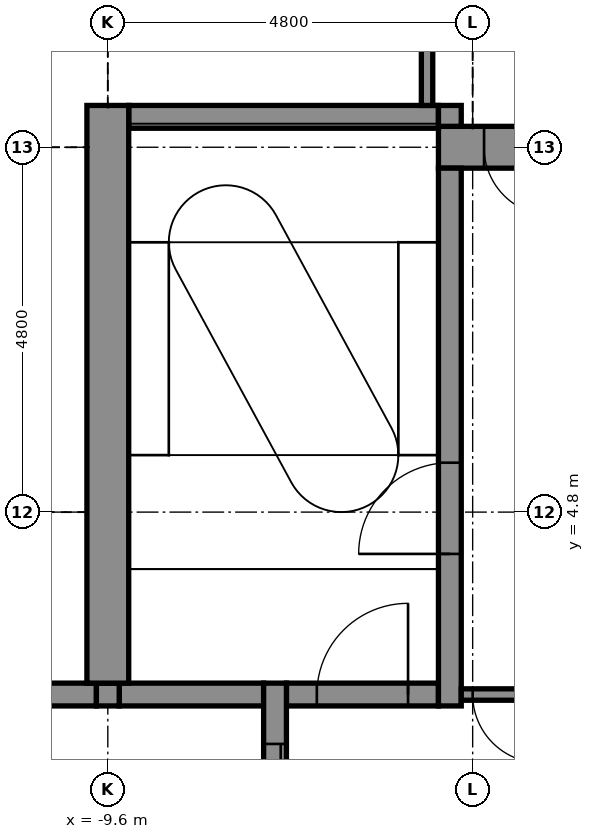
"""IFC4 building model, lengths in metres.
Left out: names, types, materials, properties, quantities, classifications, styles, units other than length and angle.
Written with IfcOpenShell. Run it as: python <this file> out.ifc"""

import sys

from ifc_helpers import new_model, si_unit, direction, frame, frame_2d, origin, place, context, subcontext, project, spatial, rectangle, extrude, element, fill, save


model = new_model("IFC4")
c1 = context("Model", 3, precision=1e-05, world=origin(), true_north=direction((0.0, 1.0)))
c2 = subcontext(c1, "Body", "Model", "MODEL_VIEW")
j1 = project(units=[si_unit("LENGTHUNIT", "METRE"), si_unit("PLANEANGLEUNIT", "RADIAN")], contexts=[c1])
p1 = place(None, origin())
s1 = spatial("IfcSite", under=j1, at=p1, CompositionType="ELEMENT")
p2 = place(p1, origin())
s2 = spatial("IfcBuilding", under=s1, at=p2, CompositionType="ELEMENT")
p3 = place(p2, frame((0.0, 0.0, 242.3)))
s3 = spatial("IfcBuildingStorey", under=s2, at=p3, CompositionType="ELEMENT", Elevation=242.3)
p4 = place(p3, frame((-10.85, 2.4, -0.15), z_axis=(0.0, 0.0, 1.0), x_axis=(1.0, 0.0, 0.0)))
e1 = element("IfcWall", 1, at=p4, inside=s3, PredefinedType="STANDARD", context=c2, shape_type="SweptSolid", body=[
    extrude(rectangle(XDim=1.1, YDim=0.3, at=frame_2d((0.55, 0.0))), origin(), (0.0, 0.0, 1.0), 3.9),
])
p5 = place(p3, frame((-9.45, 2.4, -0.15), z_axis=(0.0, 0.0, 1.0), x_axis=(1.0, 0.0, 0.0)))
e2 = element("IfcWall", 2, at=p5, inside=s3, PredefinedType="STANDARD", context=c2, shape_type="SweptSolid", body=[
    extrude(rectangle(XDim=1.9, YDim=0.3, at=frame_2d((0.95, 0.0))), origin(), (0.0, 0.0, 1.0), 3.9),
])
p6 = place(p3, frame((-7.25, 2.4, -0.15), z_axis=(0.0, 0.0, 1.0), x_axis=(1.0, 0.0, 0.0)))
e3 = element("IfcWall", 3, at=p6, inside=s3, PredefinedType="STANDARD", context=c2, shape_type="SweptSolid", body=[
    extrude(rectangle(XDim=2.0, YDim=0.3, at=frame_2d((1.0, 0.0))), origin(), (0.0, 0.0, 1.0), 3.9),
])
p7 = place(p6, frame((0.4, 0.0, 0.15)))
e4 = element("IfcOpeningElement", 4, at=p7, cuts=e3, PredefinedType="OPENING", context=c2, shape_type="SweptSolid", body=[
    extrude(rectangle(XDim=1.2, YDim=2.1, at=frame_2d((0.6, 1.05))), frame((0.0, 0.16, 0.0), z_axis=(0.0, -1.0, 0.0), x_axis=(1.0, 0.0, 0.0)), (0.0, 0.0, 1.0), 0.32),
])
p8 = place(p3, frame((-5.25, 9.6, -0.15), z_axis=(0.0, 0.0, 1.0), x_axis=(1.0, 0.0, 0.0)))
e5 = element("IfcWall", 5, at=p8, inside=s3, PredefinedType="SHEAR", context=c2, shape_type="SweptSolid", body=[
    extrude(rectangle(XDim=14.575, YDim=0.55, at=frame_2d((7.288, 0.0))), origin(), (0.0, 0.0, 1.0), 3.9),
])
p9 = place(p8, frame((0.6, 0.0, 0.15)))
e6 = element("IfcOpeningElement", 6, at=p9, cuts=e5, PredefinedType="OPENING", context=c2, shape_type="SweptSolid", body=[
    extrude(rectangle(XDim=0.9, YDim=2.1, at=frame_2d((0.45, 1.05))), frame((0.0, 0.285, 0.0), z_axis=(0.0, -1.0, 0.0), x_axis=(1.0, 0.0, 0.0)), (0.0, 0.0, 1.0), 0.57),
])
p10 = place(p3, frame((-9.325, 10.0, -0.15), z_axis=(0.0, 0.0, 1.0), x_axis=(1.0, 0.0, 0.0)))
e7 = element("IfcWall", 7, at=p10, inside=s3, PredefinedType="STANDARD", context=c2, shape_type="SweptSolid", body=[
    extrude(rectangle(XDim=4.075, YDim=0.3, at=frame_2d((2.038, 0.0))), origin(), (0.0, 0.0, 1.0), 3.9),
])
p11 = place(p3, frame((-9.6, 2.25, -0.15), z_axis=(0.0, 0.0, 1.0), x_axis=(0.0, 1.0, 0.0)))
e8 = element("IfcWall", 8, at=p11, inside=s3, PredefinedType="STANDARD", context=c2, shape_type="SweptSolid", body=[
    extrude(rectangle(XDim=0.3, YDim=0.3, at=frame_2d((0.15, 0.0))), origin(), (0.0, 0.0, 1.0), 3.9),
])
p12 = place(p3, frame((-9.6, 2.55, -0.15), z_axis=(0.0, 0.0, 1.0), x_axis=(0.0, 1.0, 0.0)))
e9 = element("IfcWall", 9, at=p12, inside=s3, PredefinedType="SHEAR", context=c2, shape_type="SweptSolid", body=[
    extrude(rectangle(XDim=7.6, YDim=0.55, at=frame_2d((3.8, 0.0))), origin(), (0.0, 0.0, 1.0), 3.9),
])
p13 = place(p3, frame((-7.4, -2.55, -0.15), z_axis=(0.0, 0.0, 1.0), x_axis=(0.0, 1.0, 0.0)))
e10 = element("IfcWall", 10, at=p13, inside=s3, PredefinedType="STANDARD", context=c2, shape_type="SweptSolid", body=[
    extrude(rectangle(XDim=5.1, YDim=0.3, at=frame_2d((2.55, 0.0))), origin(), (0.0, 0.0, 1.0), 3.9),
])
p14 = place(p13, frame((0.8, 0.0, 0.15)))
e11 = element("IfcOpeningElement", 11, at=p14, cuts=e10, PredefinedType="OPENING", context=c2, shape_type="SweptSolid", body=[
    extrude(rectangle(XDim=1.1, YDim=2.1, at=frame_2d((0.55, 1.05))), frame((0.0, 0.16, 0.0), z_axis=(0.0, -1.0, 0.0), x_axis=(1.0, 0.0, 0.0)), (0.0, 0.0, 1.0), 0.32),
])
p15 = place(p13, frame((3.2, 0.0, 0.15)))
e12 = element("IfcOpeningElement", 12, at=p15, cuts=e10, PredefinedType="OPENING", context=c2, shape_type="SweptSolid", body=[
    extrude(rectangle(XDim=1.1, YDim=2.1, at=frame_2d((0.55, 1.05))), frame((0.0, 0.16, 0.0), z_axis=(0.0, -1.0, 0.0), x_axis=(1.0, 0.0, 0.0)), (0.0, 0.0, 1.0), 0.32),
])
p16 = place(p3, frame((-5.1, 2.25, -0.15), z_axis=(0.0, 0.0, 1.0), x_axis=(0.0, 1.0, 0.0)))
e13 = element("IfcWall", 13, at=p16, inside=s3, PredefinedType="STANDARD", context=c2, shape_type="SweptSolid", body=[
    extrude(rectangle(XDim=7.075, YDim=0.3, at=frame_2d((3.538, 0.0))), origin(), (0.0, 0.0, 1.0), 3.9),
])
p17 = place(p16, frame((2.0, 0.0, 0.15)))
e14 = element("IfcOpeningElement", 14, at=p17, cuts=e13, PredefinedType="OPENING", context=c2, shape_type="SweptSolid", body=[
    extrude(rectangle(XDim=1.2, YDim=2.1, at=frame_2d((0.6, 1.05))), frame((0.0, 0.16, 0.0), z_axis=(0.0, -1.0, 0.0), x_axis=(1.0, 0.0, 0.0)), (0.0, 0.0, 1.0), 0.32),
])
p18 = place(p3, frame((-5.1, 9.875, -0.15), z_axis=(0.0, 0.0, 1.0), x_axis=(0.0, 1.0, 0.0)))
e15 = element("IfcWall", 15, at=p18, inside=s3, PredefinedType="STANDARD", context=c2, shape_type="SweptSolid", body=[
    extrude(rectangle(XDim=0.275, YDim=0.3, at=frame_2d((0.137, 0.0))), origin(), (0.0, 0.0, 1.0), 3.9),
])
p19 = place(p3, frame((-5.4, 10.15, 0.0), z_axis=(0.0, 0.0, 1.0), x_axis=(0.0, 1.0, 0.0)))
e16 = element("IfcWall", 16, at=p19, inside=s3, PredefinedType="PARTITIONING", context=c2, shape_type="SweptSolid", body=[
    extrude(rectangle(XDim=2.25, YDim=0.15, at=frame_2d((1.125, 0.0))), origin(), (0.0, 0.0, 1.0), 3.75),
])
p20 = place(p3, frame((-4.95, 2.4, 0.0), z_axis=(0.0, 0.0, 1.0), x_axis=(1.0, 0.0, 0.0)))
e17 = element("IfcWall", 17, at=p20, inside=s3, PredefinedType="PARTITIONING", context=c2, shape_type="SweptSolid", body=[
    extrude(rectangle(XDim=1.2, YDim=0.15, at=frame_2d((0.6, 0.0))), origin(), (0.0, 0.0, 1.0), 3.75),
])
p21 = place(p20, frame((0.15, 0.0, 0.0)))
e18 = element("IfcOpeningElement", 18, at=p21, cuts=e17, PredefinedType="OPENING", context=c2, shape_type="SweptSolid", body=[
    extrude(rectangle(XDim=0.9, YDim=2.1, at=frame_2d((0.45, 1.05))), frame((0.0, 0.085, 0.0), z_axis=(0.0, -1.0, 0.0), x_axis=(1.0, 0.0, 0.0)), (0.0, 0.0, 1.0), 0.17),
])
p22 = place(p15, origin())
e19 = element("IfcDoor", 19, at=p22, inside=s3, OperationType="DOUBLE_DOOR_SLIDING", PredefinedType="DOOR", context=c2, shape_type="SweptSolid", body=[
    extrude(rectangle(XDim=1.1, YDim=2.1, at=frame_2d((0.55, 1.05))), frame((0.0, 0.025, 0.0), z_axis=(0.0, -1.0, 0.0), x_axis=(1.0, 0.0, 0.0)), (0.0, 0.0, 1.0), 0.05),
])
fill(e12, e19)
p23 = place(p17, origin())
e20 = element("IfcDoor", 20, at=p23, inside=s3, OperationType="SINGLE_SWING_LEFT", PredefinedType="DOOR", context=c2, shape_type="SweptSolid", body=[
    extrude(rectangle(XDim=1.2, YDim=2.1, at=frame_2d((0.6, 1.05))), frame((0.0, 0.025, 0.0), z_axis=(0.0, -1.0, 0.0), x_axis=(1.0, 0.0, 0.0)), (0.0, 0.0, 1.0), 0.05),
])
fill(e14, e20)
p24 = place(p9, frame((0.9, 0.0, 0.0), z_axis=(0.0, 0.0, 1.0), x_axis=(-1.0, 0.0, 0.0)))
e21 = element("IfcDoor", 21, at=p24, inside=s3, OperationType="SINGLE_SWING_RIGHT", PredefinedType="DOOR", context=c2, shape_type="SweptSolid", body=[
    extrude(rectangle(XDim=0.9, YDim=2.1, at=frame_2d((0.45, 1.05))), frame((0.0, 0.025, 0.0), z_axis=(0.0, -1.0, 0.0), x_axis=(1.0, 0.0, 0.0)), (0.0, 0.0, 1.0), 0.05),
])
fill(e6, e21)
p25 = place(p21, frame((0.9, 0.0, 0.0), z_axis=(0.0, 0.0, 1.0), x_axis=(-1.0, 0.0, 0.0)))
e22 = element("IfcDoor", 22, at=p25, inside=s3, OperationType="SINGLE_SWING_RIGHT", PredefinedType="DOOR", context=c2, shape_type="SweptSolid", body=[
    extrude(rectangle(XDim=0.9, YDim=2.1, at=frame_2d((0.45, 1.05))), frame((0.0, 0.025, 0.0), z_axis=(0.0, -1.0, 0.0), x_axis=(1.0, 0.0, 0.0)), (0.0, 0.0, 1.0), 0.05),
])
fill(e18, e22)
p26 = place(p7, origin())
e23 = element("IfcDoor", 23, at=p26, inside=s3, OperationType="SINGLE_SWING_RIGHT", PredefinedType="DOOR", context=c2, shape_type="SweptSolid", body=[
    extrude(rectangle(XDim=1.2, YDim=2.1, at=frame_2d((0.6, 1.05))), frame((0.0, 0.025, 0.0), z_axis=(0.0, -1.0, 0.0), x_axis=(1.0, 0.0, 0.0)), (0.0, 0.0, 1.0), 0.05),
])
fill(e4, e23)
save(model, sys.argv[1])
